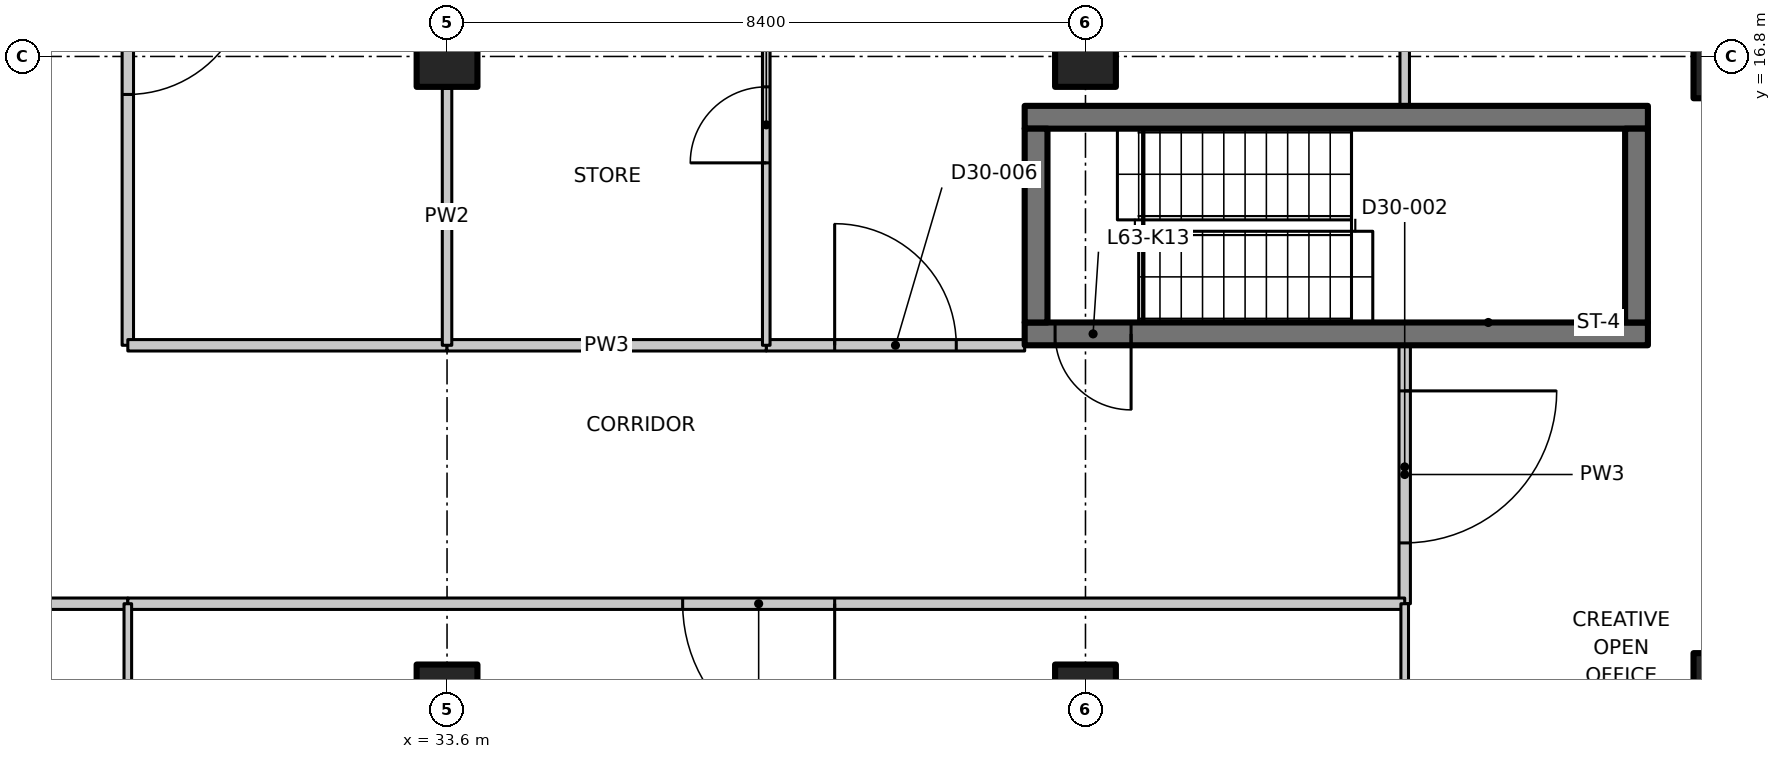
"""IFC4 building model, lengths in metres.
Left out: names, types, materials, properties, quantities, classifications, styles, units other than length and angle.
Written with IfcOpenShell. Run it as: python <this file> out.ifc"""

import sys

from ifc_helpers import new_model, si_unit, direction, frame, frame_2d, origin, origin_2d, place, context, subcontext, project, spatial, polyline, rectangle, outline, extrude, element, fill, save


model = new_model("IFC4")
c1 = context("Model", 3, precision=1e-05, world=origin(), true_north=direction((0.0, 1.0)))
c2 = subcontext(c1, "Body", "Model", "MODEL_VIEW")
j1 = project(units=[si_unit("LENGTHUNIT", "METRE"), si_unit("PLANEANGLEUNIT", "RADIAN")], contexts=[c1])
p1 = place(None, origin())
s1 = spatial("IfcSite", under=j1, at=p1, CompositionType="ELEMENT")
p2 = place(p1, origin())
s2 = spatial("IfcBuilding", under=s1, at=p2, CompositionType="ELEMENT")
p3 = place(p2, frame((0.0, 0.0, 248.1)))
s3 = spatial("IfcBuildingStorey", under=s2, at=p3, CompositionType="ELEMENT", Elevation=248.1)
for number, where, z_axis, x_axis in (
    (1, (33.6, 8.4, 0.0), (0.0, 0.0, 1.0), (1.0, 0.0, 0.0)),
    (2, (33.6, 16.8, 0.0), (0.0, 0.0, 1.0), (1.0, 0.0, 0.0)),
    (3, (42.0, 8.4, 0.0), (0.0, 0.0, 1.0), (1.0, 0.0, 0.0)),
    (4, (42.0, 16.8, 0.0), (0.0, 0.0, 1.0), (1.0, 0.0, 0.0)),
):
    element("IfcColumn", number, at=place(p3, frame(where, z_axis=z_axis, x_axis=x_axis)), inside=s3, PredefinedType="COLUMN", context=c2, shape_type="SweptSolid", body=[
        extrude(rectangle(XDim=0.8, YDim=0.8, at=origin_2d()), origin(), (0.0, 0.0, 1.0), 3.35),
    ])
for number, where, z_axis, x_axis in (
    (5, (50.4, 8.4, 0.0), (0.0, 0.0, 1.0), (1.0, 0.0, 0.0)),
    (6, (50.4, 16.8, 0.0), (0.0, 0.0, 1.0), (1.0, 0.0, 0.0)),
):
    element("IfcColumn", number, at=place(p3, frame(where, z_axis=z_axis, x_axis=x_axis)), inside=s3, PredefinedType="COLUMN", context=c2, shape_type="SweptSolid", body=[
        extrude(rectangle(XDim=0.8, YDim=1.1, at=origin_2d()), origin(), (0.0, 0.0, 1.0), 3.35),
    ])
p4 = place(p3, frame((49.4, 13.15, 0.0), z_axis=(0.0, 0.0, 1.0), x_axis=(-1.0, 0.0, 0.0)))
e7 = element("IfcWall", 7, at=p4, inside=s3, PredefinedType="SHEAR", context=c2, shape_type="SweptSolid", body=[
    extrude(rectangle(XDim=8.2, YDim=0.3, at=frame_2d((4.1, 0.0))), origin(), (0.0, 0.0, 1.0), 3.35),
])
p5 = place(p4, frame((6.8, 0.0, 0.0)))
e8 = element("IfcOpeningElement", 8, at=p5, cuts=e7, PredefinedType="OPENING", context=c2, shape_type="SweptSolid", body=[
    extrude(rectangle(XDim=1.0, YDim=2.1, at=frame_2d((0.5, 1.05))), frame((0.0, 0.16, 0.0), z_axis=(0.0, -1.0, 0.0), x_axis=(1.0, 0.0, 0.0)), (0.0, 0.0, 1.0), 0.32),
])
p6 = place(p3, frame((41.2, 16.0, 0.0), z_axis=(0.0, 0.0, 1.0), x_axis=(1.0, 0.0, 0.0)))
e9 = element("IfcWall", 9, at=p6, inside=s3, PredefinedType="SHEAR", context=c2, shape_type="SweptSolid", body=[
    extrude(rectangle(XDim=8.2, YDim=0.3, at=frame_2d((4.1, 0.0))), origin(), (0.0, 0.0, 1.0), 3.35),
])
for number, where, z_axis, x_axis in (
    (10, (41.35, 13.3, 0.0), (0.0, 0.0, 1.0), (0.0, 1.0, 0.0)),
    (11, (49.25, 13.3, 0.0), (0.0, 0.0, 1.0), (0.0, 1.0, 0.0)),
):
    element("IfcWall", number, at=place(p3, frame(where, z_axis=z_axis, x_axis=x_axis)), inside=s3, PredefinedType="SHEAR", context=c2, shape_type="SweptSolid", body=[
        extrude(rectangle(XDim=2.55, YDim=0.3, at=frame_2d((1.275, 0.0))), origin(), (0.0, 0.0, 1.0), 3.35),
    ])
p7 = place(p3, frame((29.4, 9.6, 0.0), z_axis=(0.0, 0.0, 1.0), x_axis=(-1.0, 0.0, 0.0)))
e12 = element("IfcWall", 12, at=p7, inside=s3, PredefinedType="PARTITIONING", context=c2, shape_type="SweptSolid", body=[
    extrude(rectangle(XDim=4.2, YDim=0.15, at=frame_2d((2.1, 0.0))), origin(), (0.0, 0.0, 1.0), 3.33),
])
p8 = place(p7, frame((1.5, 0.0, 0.0)))
e13 = element("IfcOpeningElement", 13, at=p8, cuts=e12, PredefinedType="OPENING", context=c2, shape_type="SweptSolid", body=[
    extrude(rectangle(XDim=1.1, YDim=2.1, at=frame_2d((0.55, 1.05))), frame((0.0, 0.085, 0.0), z_axis=(0.0, -1.0, 0.0), x_axis=(1.0, 0.0, 0.0)), (0.0, 0.0, 1.0), 0.17),
])
p9 = place(p3, frame((29.4, 21.2, 0.0), z_axis=(0.0, 0.0, 1.0), x_axis=(0.0, -1.0, 0.0)))
e14 = element("IfcWall", 14, at=p9, inside=s3, PredefinedType="PARTITIONING", context=c2, shape_type="SweptSolid", body=[
    extrude(rectangle(XDim=8.2, YDim=0.15, at=frame_2d((4.1, 0.0))), origin(), (0.0, 0.0, 1.0), 3.33),
])
p10 = place(p9, frame((3.3, 0.0, 0.0)))
e15 = element("IfcOpeningElement", 15, at=p10, cuts=e14, PredefinedType="OPENING", context=c2, shape_type="SweptSolid", body=[
    extrude(rectangle(XDim=1.6, YDim=2.1, at=frame_2d((0.8, 1.05))), frame((0.0, 0.085, 0.0), z_axis=(0.0, -1.0, 0.0), x_axis=(1.0, 0.0, 0.0)), (0.0, 0.0, 1.0), 0.17),
])
p11 = place(p3, frame((46.2, 13.0, 0.0), z_axis=(0.0, 0.0, 1.0), x_axis=(0.0, -1.0, 0.0)))
e16 = element("IfcWall", 16, at=p11, inside=s3, PredefinedType="PARTITIONING", context=c2, shape_type="SweptSolid", body=[
    extrude(rectangle(XDim=3.4, YDim=0.15, at=frame_2d((1.7, 0.0))), origin(), (0.0, 0.0, 1.0), 3.33),
])
p12 = place(p11, frame((0.6, 0.0, 0.0)))
e17 = element("IfcOpeningElement", 17, at=p12, cuts=e16, PredefinedType="OPENING", context=c2, shape_type="SweptSolid", body=[
    extrude(rectangle(XDim=2.0, YDim=2.4, at=frame_2d((1.0, 1.2))), frame((0.0, 0.085, 0.0), z_axis=(0.0, -1.0, 0.0), x_axis=(1.0, 0.0, 0.0)), (0.0, 0.0, 1.0), 0.17),
])
p13 = place(p3, frame((46.2, 9.6, 0.0), z_axis=(0.0, 0.0, 1.0), x_axis=(-1.0, 0.0, 0.0)))
e18 = element("IfcWall", 18, at=p13, inside=s3, PredefinedType="PARTITIONING", context=c2, shape_type="SweptSolid", body=[
    extrude(rectangle(XDim=16.8, YDim=0.15, at=frame_2d((8.4, 0.0))), origin(), (0.0, 0.0, 1.0), 3.33),
])
p14 = place(p13, frame((7.5, 0.0, 0.0)))
e19 = element("IfcOpeningElement", 19, at=p14, cuts=e18, PredefinedType="OPENING", context=c2, shape_type="SweptSolid", body=[
    extrude(rectangle(XDim=2.0, YDim=2.4, at=frame_2d((1.0, 1.2))), frame((0.0, 0.085, 0.0), z_axis=(0.0, -1.0, 0.0), x_axis=(1.0, 0.0, 0.0)), (0.0, 0.0, 1.0), 0.17),
])
p15 = place(p3, frame((29.4, 13.0, 0.0), z_axis=(0.0, 0.0, 1.0), x_axis=(1.0, 0.0, 0.0)))
e20 = element("IfcWall", 20, at=p15, inside=s3, PredefinedType="PARTITIONING", context=c2, shape_type="SweptSolid", body=[
    extrude(rectangle(XDim=4.2, YDim=0.15, at=frame_2d((2.1, 0.0))), origin(), (0.0, 0.0, 1.0), 3.33),
])
p16 = place(p3, frame((37.8, 13.0, 0.0), z_axis=(0.0, 0.0, 1.0), x_axis=(1.0, 0.0, 0.0)))
e21 = element("IfcWall", 21, at=p16, inside=s3, PredefinedType="PARTITIONING", context=c2, shape_type="SweptSolid", body=[
    extrude(rectangle(XDim=3.4, YDim=0.15, at=frame_2d((1.7, 0.0))), origin(), (0.0, 0.0, 1.0), 3.33),
])
p17 = place(p16, frame((0.9, 0.0, 0.0)))
e22 = element("IfcOpeningElement", 22, at=p17, cuts=e21, PredefinedType="OPENING", context=c2, shape_type="SweptSolid", body=[
    extrude(rectangle(XDim=1.6, YDim=2.1, at=frame_2d((0.8, 1.05))), frame((0.0, 0.085, 0.0), z_axis=(0.0, -1.0, 0.0), x_axis=(1.0, 0.0, 0.0)), (0.0, 0.0, 1.0), 0.17),
])
p18 = place(p3, frame((33.6, 13.0, 0.0), z_axis=(0.0, 0.0, 1.0), x_axis=(1.0, 0.0, 0.0)))
e23 = element("IfcWall", 23, at=p18, inside=s3, PredefinedType="PARTITIONING", context=c2, shape_type="SweptSolid", body=[
    extrude(rectangle(XDim=4.2, YDim=0.15, at=frame_2d((2.1, 0.0))), origin(), (0.0, 0.0, 1.0), 3.33),
])
p19 = place(p3, frame((46.2, -0.2, 0.0), z_axis=(0.0, 0.0, 1.0), x_axis=(0.0, 1.0, 0.0)))
e24 = element("IfcWall", 24, at=p19, inside=s3, PredefinedType="PARTITIONING", context=c2, shape_type="SweptSolid", body=[
    extrude(outline(polyline([(0.0, 0.0), (9.8, 0.0), (9.8, 3.33), (5.066, 3.33), (5.064, 2.98), (3.736, 2.98), (3.734, 3.33), (0.0, 3.33), (0.0, 0.0)])), frame((0.0, 0.05, 0.0), z_axis=(0.0, -1.0, 0.0), x_axis=(1.0, 0.0, 0.0)), (0.0, 0.0, 1.0), 0.1),
])
p20 = place(p3, frame((46.2, 16.15, 0.0), z_axis=(0.0, 0.0, 1.0), x_axis=(0.0, 1.0, 0.0)))
e25 = element("IfcWall", 25, at=p20, inside=s3, PredefinedType="PARTITIONING", context=c2, shape_type="SweptSolid", body=[
    extrude(outline(polyline([(0.0, 0.0), (9.656, 0.0), (9.656, 3.33), (9.25, 3.33), (5.528, 3.33), (5.526, 2.98), (4.174, 2.98), (4.172, 3.33), (0.0, 3.33), (0.0, 0.0)])), frame((0.0, 0.062, 0.0), z_axis=(0.0, -1.0, 0.0), x_axis=(1.0, 0.0, 0.0)), (0.0, 0.0, 1.0), 0.125),
])
p21 = place(p3, frame((29.4, 9.6, 0.0), z_axis=(0.0, 0.0, 1.0), x_axis=(0.0, -1.0, 0.0)))
e26 = element("IfcWall", 26, at=p21, inside=s3, PredefinedType="PARTITIONING", context=c2, shape_type="SweptSolid", body=[
    extrude(outline(polyline([(0.0, 0.0), (12.6, 0.0), (12.6, 3.33), (10.05, 3.33), (10.048, 2.98), (9.152, 2.98), (9.15, 3.33), (0.0, 3.33), (0.0, 0.0)])), frame((0.0, 0.05, 0.0), z_axis=(0.0, -1.0, 0.0), x_axis=(1.0, 0.0, 0.0)), (0.0, 0.0, 1.0), 0.1),
])
p22 = place(p3, frame((33.6, 16.38, 0.0), z_axis=(0.0, 0.0, 1.0), x_axis=(0.0, -1.0, 0.0)))
e27 = element("IfcWall", 27, at=p22, inside=s3, PredefinedType="PARTITIONING", context=c2, shape_type="SweptSolid", body=[
    extrude(rectangle(XDim=3.38, YDim=0.125, at=frame_2d((1.69, 0.0))), origin(), (0.0, 0.0, 1.0), 3.33),
])
p23 = place(p3, frame((37.8, 13.0, 0.0), z_axis=(0.0, 0.0, 1.0), x_axis=(0.0, 1.0, 0.0)))
e28 = element("IfcWall", 28, at=p23, inside=s3, PredefinedType="PARTITIONING", context=c2, shape_type="SweptSolid", body=[
    extrude(rectangle(XDim=6.0, YDim=0.1, at=frame_2d((3.0, 0.0))), origin(), (0.0, 0.0, 1.0), 3.33),
])
p24 = place(p23, frame((2.4, 0.0, 0.0)))
e29 = element("IfcOpeningElement", 29, at=p24, cuts=e28, PredefinedType="OPENING", context=c2, shape_type="SweptSolid", body=[
    extrude(rectangle(XDim=1.0, YDim=2.1, at=frame_2d((0.5, 1.05))), frame((0.0, 0.06, 0.0), z_axis=(0.0, -1.0, 0.0), x_axis=(1.0, 0.0, 0.0)), (0.0, 0.0, 1.0), 0.12),
])
p25 = place(p5, origin())
e30 = element("IfcDoor", 30, at=p25, inside=s3, OperationType="SINGLE_SWING_RIGHT", PredefinedType="DOOR", context=c2, shape_type="SweptSolid", body=[
    extrude(rectangle(XDim=1.0, YDim=2.1, at=frame_2d((0.5, 1.05))), frame((0.0, 0.025, 0.0), z_axis=(0.0, -1.0, 0.0), x_axis=(1.0, 0.0, 0.0)), (0.0, 0.0, 1.0), 0.05),
])
fill(e8, e30)
p26 = place(p12, origin())
e31 = element("IfcDoor", 31, at=p26, inside=s3, OperationType="DOUBLE_DOOR_SINGLE_SWING", PredefinedType="DOOR", context=c2, shape_type="SweptSolid", body=[
    extrude(rectangle(XDim=2.0, YDim=2.4, at=frame_2d((1.0, 1.2))), frame((0.0, 0.025, 0.0), z_axis=(0.0, -1.0, 0.0), x_axis=(1.0, 0.0, 0.0)), (0.0, 0.0, 1.0), 0.05),
])
fill(e17, e31)
p27 = place(p14, origin())
e32 = element("IfcDoor", 32, at=p27, inside=s3, OperationType="DOUBLE_DOOR_SINGLE_SWING", PredefinedType="DOOR", context=c2, shape_type="SweptSolid", body=[
    extrude(rectangle(XDim=2.0, YDim=2.4, at=frame_2d((1.0, 1.2))), frame((0.0, 0.025, 0.0), z_axis=(0.0, -1.0, 0.0), x_axis=(1.0, 0.0, 0.0)), (0.0, 0.0, 1.0), 0.05),
])
fill(e19, e32)
p28 = place(p10, origin())
e33 = element("IfcDoor", 33, at=p28, inside=s3, OperationType="DOUBLE_DOOR_SINGLE_SWING", PredefinedType="DOOR", context=c2, shape_type="SweptSolid", body=[
    extrude(rectangle(XDim=1.6, YDim=2.1, at=frame_2d((0.8, 1.05))), frame((0.0, 0.025, 0.0), z_axis=(0.0, -1.0, 0.0), x_axis=(1.0, 0.0, 0.0)), (0.0, 0.0, 1.0), 0.05),
])
fill(e15, e33)
p29 = place(p17, origin())
e34 = element("IfcDoor", 34, at=p29, inside=s3, OperationType="DOUBLE_DOOR_SINGLE_SWING", PredefinedType="DOOR", context=c2, shape_type="SweptSolid", body=[
    extrude(rectangle(XDim=1.6, YDim=2.1, at=frame_2d((0.8, 1.05))), frame((0.0, 0.025, 0.0), z_axis=(0.0, -1.0, 0.0), x_axis=(1.0, 0.0, 0.0)), (0.0, 0.0, 1.0), 0.05),
])
fill(e22, e34)
p30 = place(p24, origin())
e35 = element("IfcDoor", 35, at=p30, inside=s3, OperationType="SINGLE_SWING_LEFT", PredefinedType="DOOR", context=c2, shape_type="SweptSolid", body=[
    extrude(rectangle(XDim=1.0, YDim=2.1, at=frame_2d((0.5, 1.05))), frame((0.0, 0.025, 0.0), z_axis=(0.0, -1.0, 0.0), x_axis=(1.0, 0.0, 0.0)), (0.0, 0.0, 1.0), 0.05),
])
fill(e29, e35)
save(model, sys.argv[1])
